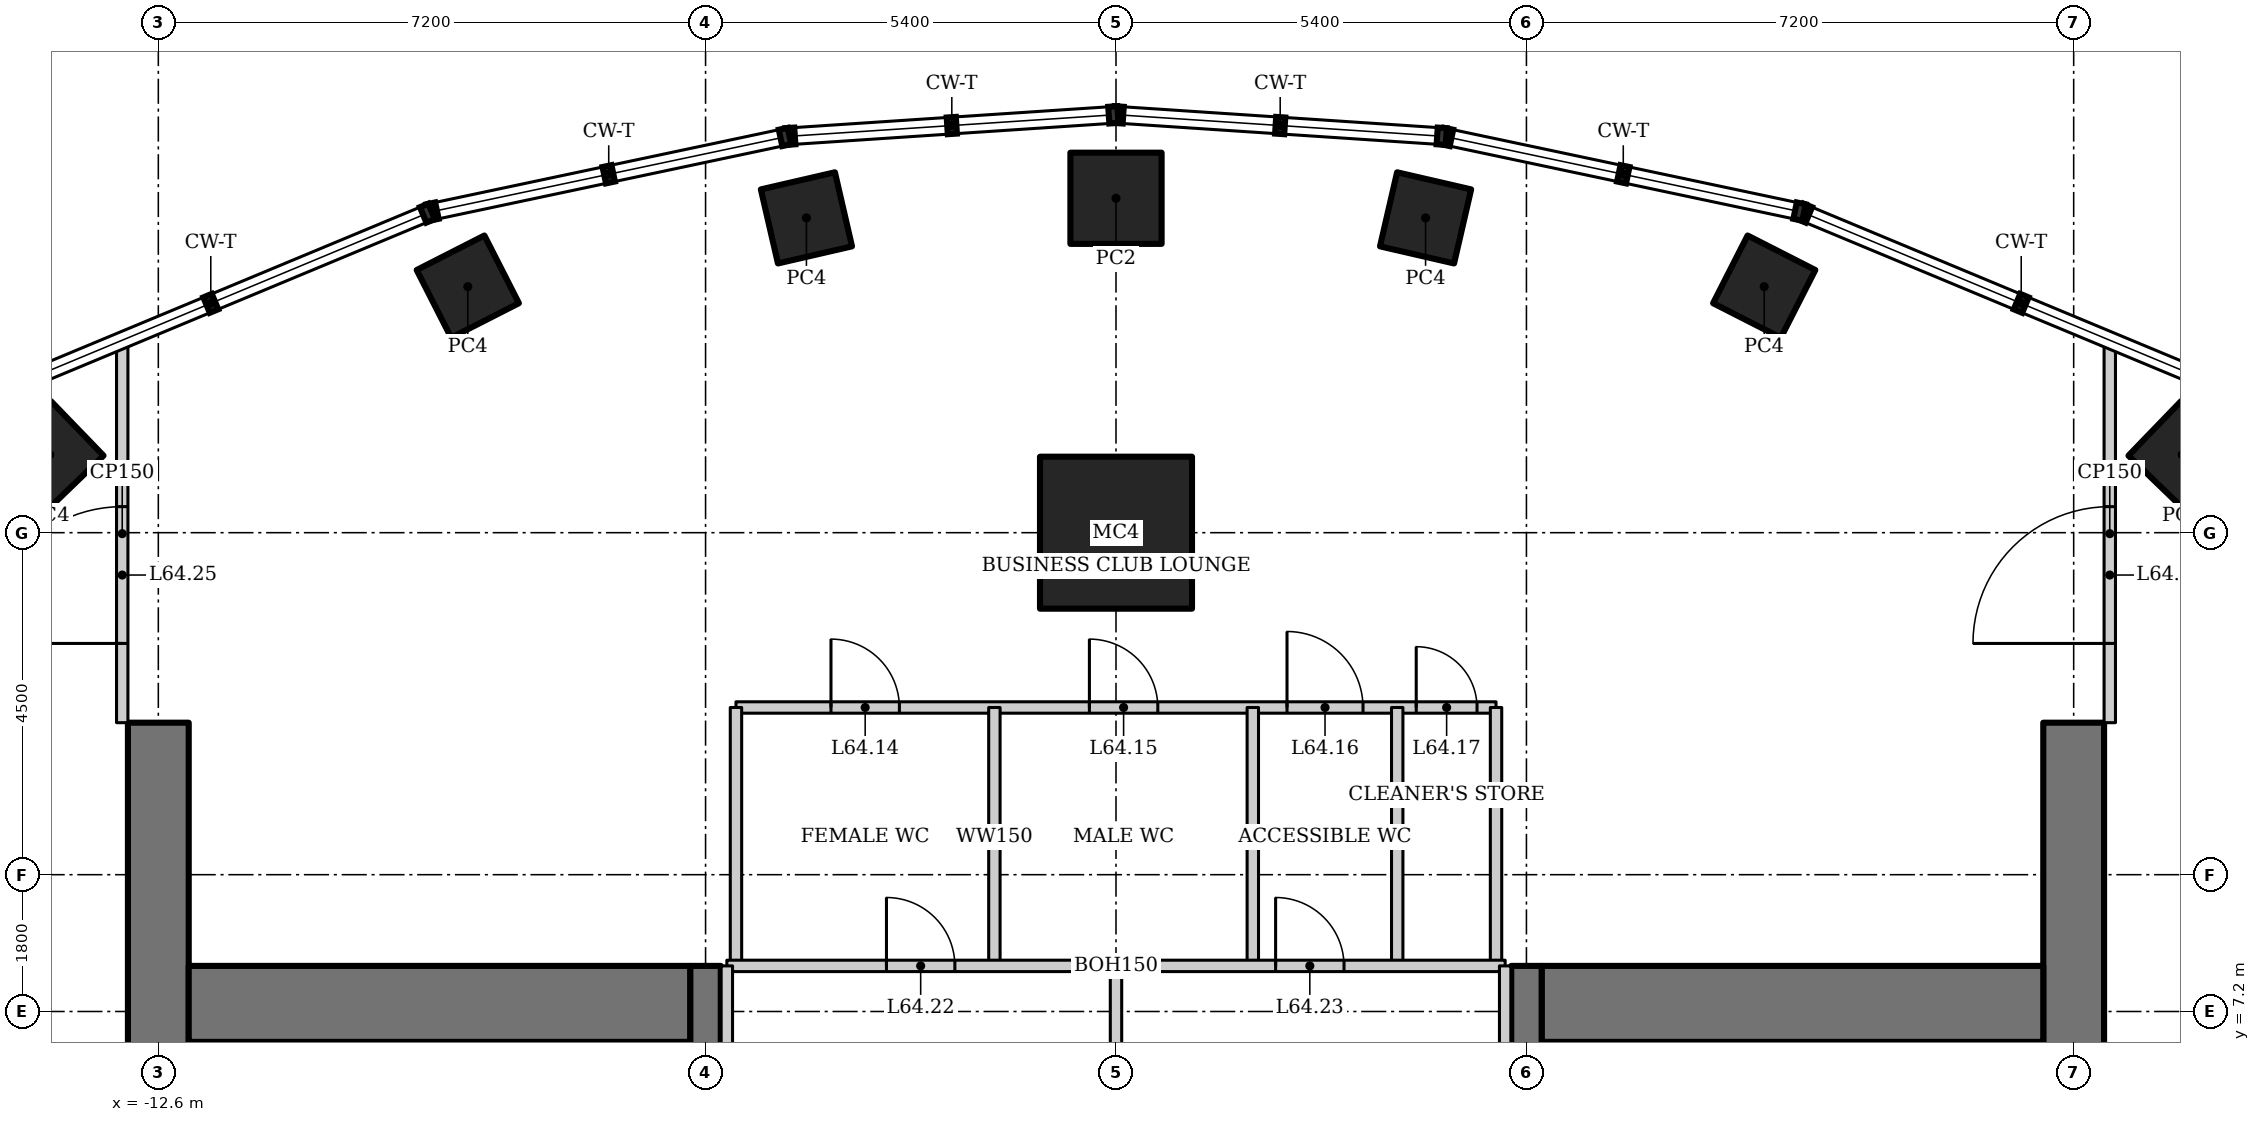
"""IFC4 building model, lengths in metres.
Left out: names, types, materials, properties, quantities, classifications, styles, units other than length and angle.
Written with IfcOpenShell. Run it as: python <this file> out.ifc"""

import sys

from ifc_helpers import new_model, si_unit, direction, frame, frame_2d, origin, origin_2d, place, context, subcontext, project, spatial, rectangle, hollow_rectangle, extrude, element, fill, save


model = new_model("IFC4")
c1 = context("Model", 3, precision=1e-05, world=origin(), true_north=direction((0.0, 1.0)))
c2 = subcontext(c1, "Body", "Model", "MODEL_VIEW")
j1 = project(units=[si_unit("LENGTHUNIT", "METRE"), si_unit("PLANEANGLEUNIT", "RADIAN")], contexts=[c1])
p1 = place(None, origin())
s1 = spatial("IfcSite", under=j1, at=p1, CompositionType="ELEMENT")
p2 = place(p1, origin())
s2 = spatial("IfcBuilding", under=s1, at=p2, CompositionType="ELEMENT")
p3 = place(p2, frame((0.0, 0.0, 274.9)))
s3 = spatial("IfcBuildingStorey", under=s2, at=p3, CompositionType="ELEMENT", Elevation=274.9)
p4 = place(p3, frame((0.0, 13.5, 0.0), z_axis=(0.0, 0.0, 1.0), x_axis=(1.0, 0.0, 0.0)))
e1 = element("IfcColumn", 1, at=p4, inside=s3, PredefinedType="COLUMN", context=c2, shape_type="SweptSolid", body=[
    extrude(hollow_rectangle(XDim=2.0, YDim=2.0, WallThickness=0.15, at=origin_2d()), origin(), (0.0, 0.0, 1.0), 4.5),
])
for number, where, z_axis, x_axis in (
    (2, (14.028, 14.526, 0.0), (0.0, 0.0, 1.0), (0.695, 0.719, 0.0)),
    (3, (8.528, 16.738, 0.0), (0.0, 0.0, 1.0), (0.454, 0.891, 0.0)),
    (4, (4.073, 17.642, 0.0), (0.0, 0.0, 1.0), (0.225, 0.974, 0.0)),
):
    element("IfcColumn", number, at=place(p3, frame(where, z_axis=z_axis, x_axis=x_axis)), inside=s3, PredefinedType="COLUMN", context=c2, shape_type="SweptSolid", body=[
        extrude(hollow_rectangle(XDim=1.0, YDim=1.0, WallThickness=0.08, at=origin_2d()), origin(), (0.0, 0.0, 1.0), 4.5),
    ])
p5 = place(p3, frame((0.0, 17.9, 0.0), z_axis=(0.0, 0.0, 1.0), x_axis=(1.0, 0.0, 0.0)))
e5 = element("IfcColumn", 5, at=p5, inside=s3, PredefinedType="COLUMN", context=c2, shape_type="SweptSolid", body=[
    extrude(hollow_rectangle(XDim=1.2, YDim=1.2, WallThickness=0.1, at=origin_2d()), origin(), (0.0, 0.0, 1.0), 4.5),
])
for number, where, z_axis, x_axis in (
    (6, (-4.073, 17.642, 0.0), (0.0, 0.0, 1.0), (0.974, 0.225, 0.0)),
    (7, (-8.528, 16.738, 0.0), (0.0, 0.0, 1.0), (0.891, 0.454, 0.0)),
    (8, (-14.028, 14.526, 0.0), (0.0, 0.0, 1.0), (0.719, 0.695, 0.0)),
):
    element("IfcColumn", number, at=place(p3, frame(where, z_axis=z_axis, x_axis=x_axis)), inside=s3, PredefinedType="COLUMN", context=c2, shape_type="SweptSolid", body=[
        extrude(hollow_rectangle(XDim=1.0, YDim=1.0, WallThickness=0.08, at=origin_2d()), origin(), (0.0, 0.0, 1.0), 4.5),
    ])
p6 = place(p3, frame((12.6, -11.0, 0.0), z_axis=(0.0, 0.0, 1.0), x_axis=(0.0, 1.0, 0.0)))
e9 = element("IfcWall", 9, at=p6, inside=s3, PredefinedType="SHEAR", context=c2, shape_type="SweptSolid", body=[
    extrude(rectangle(XDim=22.0, YDim=0.8, at=frame_2d((11.0, 0.0))), origin(), (0.0, 0.0, 1.0), 4.5),
])
p7 = place(p6, frame((10.1, 0.0, 0.0)))
e10 = element("IfcOpeningElement", 10, at=p7, cuts=e9, PredefinedType="OPENING", context=c2, shape_type="SweptSolid", body=[
    extrude(rectangle(XDim=1.8, YDim=2.1, at=frame_2d((0.9, 1.05))), frame((0.0, 0.41, 0.0), z_axis=(0.0, -1.0, 0.0), x_axis=(1.0, 0.0, 0.0)), (0.0, 0.0, 1.0), 0.82),
])
p8 = place(p3, frame((-12.6, 11.0, 0.0), z_axis=(0.0, 0.0, 1.0), x_axis=(0.0, -1.0, 0.0)))
e11 = element("IfcWall", 11, at=p8, inside=s3, PredefinedType="SHEAR", context=c2, shape_type="SweptSolid", body=[
    extrude(rectangle(XDim=22.0, YDim=0.8, at=frame_2d((11.0, 0.0))), origin(), (0.0, 0.0, 1.0), 4.5),
])
p9 = place(p8, frame((10.1, 0.0, 0.0)))
e12 = element("IfcOpeningElement", 12, at=p9, cuts=e11, PredefinedType="OPENING", context=c2, shape_type="SweptSolid", body=[
    extrude(rectangle(XDim=1.8, YDim=2.1, at=frame_2d((0.9, 1.05))), frame((0.0, 0.41, 0.0), z_axis=(0.0, -1.0, 0.0), x_axis=(1.0, 0.0, 0.0)), (0.0, 0.0, 1.0), 0.82),
])
for number, where, z_axis, x_axis in (
    (13, (12.2, 7.3, 0.0), (0.0, 0.0, 1.0), (-1.0, 0.0, 0.0)),
    (14, (-5.6, 7.3, 0.0), (0.0, 0.0, 1.0), (-1.0, 0.0, 0.0)),
):
    element("IfcWall", number, at=place(p3, frame(where, z_axis=z_axis, x_axis=x_axis)), inside=s3, PredefinedType="SHEAR", context=c2, shape_type="SweptSolid", body=[
        extrude(rectangle(XDim=6.6, YDim=1.0, at=frame_2d((3.3, 0.0))), origin(), (0.0, 0.0, 1.0), 4.5),
    ])
p10 = place(p3, frame((5.4, -6.8, 0.0), z_axis=(0.0, 0.0, 1.0), x_axis=(0.0, 1.0, 0.0)))
e15 = element("IfcWall", 15, at=p10, inside=s3, PredefinedType="SHEAR", context=c2, shape_type="SweptSolid", body=[
    extrude(rectangle(XDim=14.6, YDim=0.4, at=frame_2d((7.3, 0.0))), origin(), (0.0, 0.0, 1.0), 4.5),
])
p11 = place(p10, frame((5.9, 0.0, 0.0)))
e16 = element("IfcOpeningElement", 16, at=p11, cuts=e15, PredefinedType="OPENING", context=c2, shape_type="SweptSolid", body=[
    extrude(rectangle(XDim=1.8, YDim=2.1, at=frame_2d((0.9, 1.05))), frame((0.0, 0.21, 0.0), z_axis=(0.0, -1.0, 0.0), x_axis=(1.0, 0.0, 0.0)), (0.0, 0.0, 1.0), 0.42),
])
p12 = place(p3, frame((-5.4, 7.8, 0.0), z_axis=(0.0, 0.0, 1.0), x_axis=(0.0, -1.0, 0.0)))
e17 = element("IfcWall", 17, at=p12, inside=s3, PredefinedType="SHEAR", context=c2, shape_type="SweptSolid", body=[
    extrude(rectangle(XDim=14.6, YDim=0.4, at=frame_2d((7.3, 0.0))), origin(), (0.0, 0.0, 1.0), 4.5),
])
p13 = place(p12, frame((6.4, 0.0, 0.0)))
e18 = element("IfcOpeningElement", 18, at=p13, cuts=e17, PredefinedType="OPENING", context=c2, shape_type="SweptSolid", body=[
    extrude(rectangle(XDim=1.8, YDim=2.1, at=frame_2d((0.9, 1.05))), frame((0.0, 0.21, 0.0), z_axis=(0.0, -1.0, 0.0), x_axis=(1.0, 0.0, 0.0)), (0.0, 0.0, 1.0), 0.42),
])
p14 = place(p3, frame((-13.075, 11.0, 0.0), z_axis=(0.0, 0.0, 1.0), x_axis=(0.0, 1.0, 0.0)))
e19 = element("IfcWall", 19, at=p14, inside=s3, PredefinedType="PARTITIONING", context=c2, shape_type="SweptSolid", body=[
    extrude(rectangle(XDim=4.974, YDim=0.15, at=frame_2d((2.487, 0.0))), origin(), (0.0, 0.0, 1.0), 4.35),
])
p15 = place(p14, frame((1.043, 0.0, 0.0)))
e20 = element("IfcOpeningElement", 20, at=p15, cuts=e19, PredefinedType="OPENING", context=c2, shape_type="SweptSolid", body=[
    extrude(rectangle(XDim=1.8, YDim=2.1, at=frame_2d((0.9, 1.05))), frame((0.0, 0.085, 0.0), z_axis=(0.0, -1.0, 0.0), x_axis=(1.0, 0.0, 0.0)), (0.0, 0.0, 1.0), 0.17),
])
p16 = place(p3, frame((13.075, 11.0, 0.0), z_axis=(0.0, 0.0, 1.0), x_axis=(0.0, 1.0, 0.0)))
e21 = element("IfcWall", 21, at=p16, inside=s3, PredefinedType="PARTITIONING", context=c2, shape_type="SweptSolid", body=[
    extrude(rectangle(XDim=4.974, YDim=0.15, at=frame_2d((2.487, 0.0))), origin(), (0.0, 0.0, 1.0), 4.35),
])
p17 = place(p16, frame((1.043, 0.0, 0.0)))
e22 = element("IfcOpeningElement", 22, at=p17, cuts=e21, PredefinedType="OPENING", context=c2, shape_type="SweptSolid", body=[
    extrude(rectangle(XDim=1.8, YDim=2.1, at=frame_2d((0.9, 1.05))), frame((0.0, 0.085, 0.0), z_axis=(0.0, -1.0, 0.0), x_axis=(1.0, 0.0, 0.0)), (0.0, 0.0, 1.0), 0.17),
])
p18 = place(p3, frame((-5.0, 11.2, 0.0), z_axis=(0.0, 0.0, 1.0), x_axis=(1.0, 0.0, 0.0)))
e23 = element("IfcWall", 23, at=p18, inside=s3, PredefinedType="SOLIDWALL", context=c2, shape_type="SweptSolid", body=[
    extrude(rectangle(XDim=10.0, YDim=0.15, at=frame_2d((5.0, 0.0))), origin(), (0.0, 0.0, 1.0), 4.35),
])
p19 = place(p18, frame((1.25, 0.0, 0.0)))
e24 = element("IfcOpeningElement", 24, at=p19, cuts=e23, PredefinedType="OPENING", context=c2, shape_type="SweptSolid", body=[
    extrude(rectangle(XDim=0.9, YDim=2.1, at=frame_2d((0.45, 1.05))), frame((0.0, 0.085, 0.0), z_axis=(0.0, -1.0, 0.0), x_axis=(1.0, 0.0, 0.0)), (0.0, 0.0, 1.0), 0.17),
])
p20 = place(p18, frame((4.65, 0.0, 0.0)))
e25 = element("IfcOpeningElement", 25, at=p20, cuts=e23, PredefinedType="OPENING", context=c2, shape_type="SweptSolid", body=[
    extrude(rectangle(XDim=0.9, YDim=2.1, at=frame_2d((0.45, 1.05))), frame((0.0, 0.085, 0.0), z_axis=(0.0, -1.0, 0.0), x_axis=(1.0, 0.0, 0.0)), (0.0, 0.0, 1.0), 0.17),
])
p21 = place(p18, frame((7.25, 0.0, 0.0)))
e26 = element("IfcOpeningElement", 26, at=p21, cuts=e23, PredefinedType="OPENING", context=c2, shape_type="SweptSolid", body=[
    extrude(rectangle(XDim=1.0, YDim=2.1, at=frame_2d((0.5, 1.05))), frame((0.0, 0.085, 0.0), z_axis=(0.0, -1.0, 0.0), x_axis=(1.0, 0.0, 0.0)), (0.0, 0.0, 1.0), 0.17),
])
p22 = place(p18, frame((8.95, 0.0, 0.0)))
e27 = element("IfcOpeningElement", 27, at=p22, cuts=e23, PredefinedType="OPENING", context=c2, shape_type="SweptSolid", body=[
    extrude(rectangle(XDim=0.8, YDim=2.1, at=frame_2d((0.4, 1.05))), frame((0.0, 0.085, 0.0), z_axis=(0.0, -1.0, 0.0), x_axis=(1.0, 0.0, 0.0)), (0.0, 0.0, 1.0), 0.17),
])
for number, where, z_axis, x_axis in (
    (28, (-5.0, 7.8, 0.0), (0.0, 0.0, 1.0), (0.0, 1.0, 0.0)),
    (29, (5.0, 7.8, 0.0), (0.0, 0.0, 1.0), (0.0, 1.0, 0.0)),
    (30, (-1.6, 7.8, 0.0), (0.0, 0.0, 1.0), (0.0, 1.0, 0.0)),
):
    element("IfcWall", number, at=place(p3, frame(where, z_axis=z_axis, x_axis=x_axis)), inside=s3, PredefinedType="SOLIDWALL", context=c2, shape_type="SweptSolid", body=[
        extrude(rectangle(XDim=3.4, YDim=0.15, at=frame_2d((1.7, 0.0))), origin(), (0.0, 0.0, 1.0), 4.35),
    ])
p23 = place(p3, frame((1.8, 7.8, 0.0), z_axis=(0.0, 0.0, 1.0), x_axis=(0.0, 1.0, 0.0)))
e31 = element("IfcWall", 31, at=p23, inside=s3, PredefinedType="SOLIDWALL", context=c2, shape_type="SweptSolid", body=[
    extrude(rectangle(XDim=3.4, YDim=0.15, at=frame_2d((1.7, 0.0))), origin(), (0.0, 0.0, 1.0), 3.408),
])
p24 = place(p3, frame((3.7, 7.8, 0.0), z_axis=(0.0, 0.0, 1.0), x_axis=(0.0, 1.0, 0.0)))
e32 = element("IfcWall", 32, at=p24, inside=s3, PredefinedType="SOLIDWALL", context=c2, shape_type="SweptSolid", body=[
    extrude(rectangle(XDim=3.4, YDim=0.15, at=frame_2d((1.7, 0.0))), origin(), (0.0, 0.0, 1.0), 4.35),
])
p25 = place(p3, frame((-5.12, 7.8, 0.0), z_axis=(0.0, 0.0, 1.0), x_axis=(1.0, 0.0, 0.0)))
e33 = element("IfcWall", 33, at=p25, inside=s3, PredefinedType="PARTITIONING", context=c2, shape_type="SweptSolid", body=[
    extrude(rectangle(XDim=10.24, YDim=0.15, at=frame_2d((5.12, 0.0))), origin(), (0.0, 0.0, 1.0), 4.35),
])
p26 = place(p25, frame((2.1, 0.0, 0.0)))
e34 = element("IfcOpeningElement", 34, at=p26, cuts=e33, PredefinedType="OPENING", context=c2, shape_type="SweptSolid", body=[
    extrude(rectangle(XDim=0.9, YDim=2.1, at=frame_2d((0.45, 1.05))), frame((0.0, 0.085, 0.0), z_axis=(0.0, -1.0, 0.0), x_axis=(1.0, 0.0, 0.0)), (0.0, 0.0, 1.0), 0.17),
])
p27 = place(p25, frame((7.22, 0.0, 0.0)))
e35 = element("IfcOpeningElement", 35, at=p27, cuts=e33, PredefinedType="OPENING", context=c2, shape_type="SweptSolid", body=[
    extrude(rectangle(XDim=0.9, YDim=2.1, at=frame_2d((0.45, 1.05))), frame((0.0, 0.085, 0.0), z_axis=(0.0, -1.0, 0.0), x_axis=(1.0, 0.0, 0.0)), (0.0, 0.0, 1.0), 0.17),
])
for number, where, z_axis, x_axis in (
    (36, (-5.12, 2.6, 0.0), (0.0, 0.0, 1.0), (0.0, 1.0, 0.0)),
    (37, (5.12, 2.6, 0.0), (0.0, 0.0, 1.0), (0.0, 1.0, 0.0)),
):
    element("IfcWall", number, at=place(p3, frame(where, z_axis=z_axis, x_axis=x_axis)), inside=s3, PredefinedType="PARTITIONING", context=c2, shape_type="SweptSolid", body=[
        extrude(rectangle(XDim=5.2, YDim=0.15, at=frame_2d((2.6, 0.0))), origin(), (0.0, 0.0, 1.0), 4.35),
    ])
p28 = place(p3, frame((0.0, 2.6, 0.0), z_axis=(0.0, 0.0, 1.0), x_axis=(0.0, 1.0, 0.0)))
e38 = element("IfcWall", 38, at=p28, inside=s3, PredefinedType="PARTITIONING", context=c2, shape_type="SweptSolid", body=[
    extrude(rectangle(XDim=5.2, YDim=0.15, at=frame_2d((2.6, 0.0))), origin(), (0.0, 0.0, 1.0), 3.944),
])
p29 = place(p19, origin())
e39 = element("IfcDoor", 39, at=p29, inside=s3, OperationType="SINGLE_SWING_LEFT", PredefinedType="DOOR", context=c2, shape_type="SweptSolid", body=[
    extrude(rectangle(XDim=0.9, YDim=2.1, at=frame_2d((0.45, 1.05))), frame((0.0, 0.025, 0.0), z_axis=(0.0, -1.0, 0.0), x_axis=(1.0, 0.0, 0.0)), (0.0, 0.0, 1.0), 0.05),
])
fill(e24, e39)
p30 = place(p20, origin())
e40 = element("IfcDoor", 40, at=p30, inside=s3, OperationType="SINGLE_SWING_LEFT", PredefinedType="DOOR", context=c2, shape_type="SweptSolid", body=[
    extrude(rectangle(XDim=0.9, YDim=2.1, at=frame_2d((0.45, 1.05))), frame((0.0, 0.025, 0.0), z_axis=(0.0, -1.0, 0.0), x_axis=(1.0, 0.0, 0.0)), (0.0, 0.0, 1.0), 0.05),
])
fill(e25, e40)
p31 = place(p21, origin())
e41 = element("IfcDoor", 41, at=p31, inside=s3, OperationType="SINGLE_SWING_LEFT", PredefinedType="DOOR", context=c2, shape_type="SweptSolid", body=[
    extrude(rectangle(XDim=1.0, YDim=2.1, at=frame_2d((0.5, 1.05))), frame((0.0, 0.025, 0.0), z_axis=(0.0, -1.0, 0.0), x_axis=(1.0, 0.0, 0.0)), (0.0, 0.0, 1.0), 0.05),
])
fill(e26, e41)
p32 = place(p22, origin())
e42 = element("IfcDoor", 42, at=p32, inside=s3, OperationType="SINGLE_SWING_LEFT", PredefinedType="DOOR", context=c2, shape_type="SweptSolid", body=[
    extrude(rectangle(XDim=0.8, YDim=2.1, at=frame_2d((0.4, 1.05))), frame((0.0, 0.025, 0.0), z_axis=(0.0, -1.0, 0.0), x_axis=(1.0, 0.0, 0.0)), (0.0, 0.0, 1.0), 0.05),
])
fill(e27, e42)
p33 = place(p26, origin())
e43 = element("IfcDoor", 43, at=p33, inside=s3, OperationType="SINGLE_SWING_LEFT", PredefinedType="DOOR", context=c2, shape_type="SweptSolid", body=[
    extrude(rectangle(XDim=0.9, YDim=2.1, at=frame_2d((0.45, 1.05))), frame((0.0, 0.025, 0.0), z_axis=(0.0, -1.0, 0.0), x_axis=(1.0, 0.0, 0.0)), (0.0, 0.0, 1.0), 0.05),
])
fill(e34, e43)
p34 = place(p27, origin())
e44 = element("IfcDoor", 44, at=p34, inside=s3, OperationType="SINGLE_SWING_LEFT", PredefinedType="DOOR", context=c2, shape_type="SweptSolid", body=[
    extrude(rectangle(XDim=0.9, YDim=2.1, at=frame_2d((0.45, 1.05))), frame((0.0, 0.025, 0.0), z_axis=(0.0, -1.0, 0.0), x_axis=(1.0, 0.0, 0.0)), (0.0, 0.0, 1.0), 0.05),
])
fill(e35, e44)
p35 = place(p15, origin())
e45 = element("IfcDoor", 45, at=p35, inside=s3, OperationType="DOUBLE_DOOR_DOUBLE_SWING", PredefinedType="DOOR", context=c2, shape_type="SweptSolid", body=[
    extrude(rectangle(XDim=1.8, YDim=2.1, at=frame_2d((0.9, 1.05))), frame((0.0, 0.025, 0.0), z_axis=(0.0, -1.0, 0.0), x_axis=(1.0, 0.0, 0.0)), (0.0, 0.0, 1.0), 0.05),
])
fill(e20, e45)
p36 = place(p17, origin())
e46 = element("IfcDoor", 46, at=p36, inside=s3, OperationType="DOUBLE_DOOR_DOUBLE_SWING", PredefinedType="DOOR", context=c2, shape_type="SweptSolid", body=[
    extrude(rectangle(XDim=1.8, YDim=2.1, at=frame_2d((0.9, 1.05))), frame((0.0, 0.025, 0.0), z_axis=(0.0, -1.0, 0.0), x_axis=(1.0, 0.0, 0.0)), (0.0, 0.0, 1.0), 0.05),
])
fill(e22, e46)
save(model, sys.argv[1])
